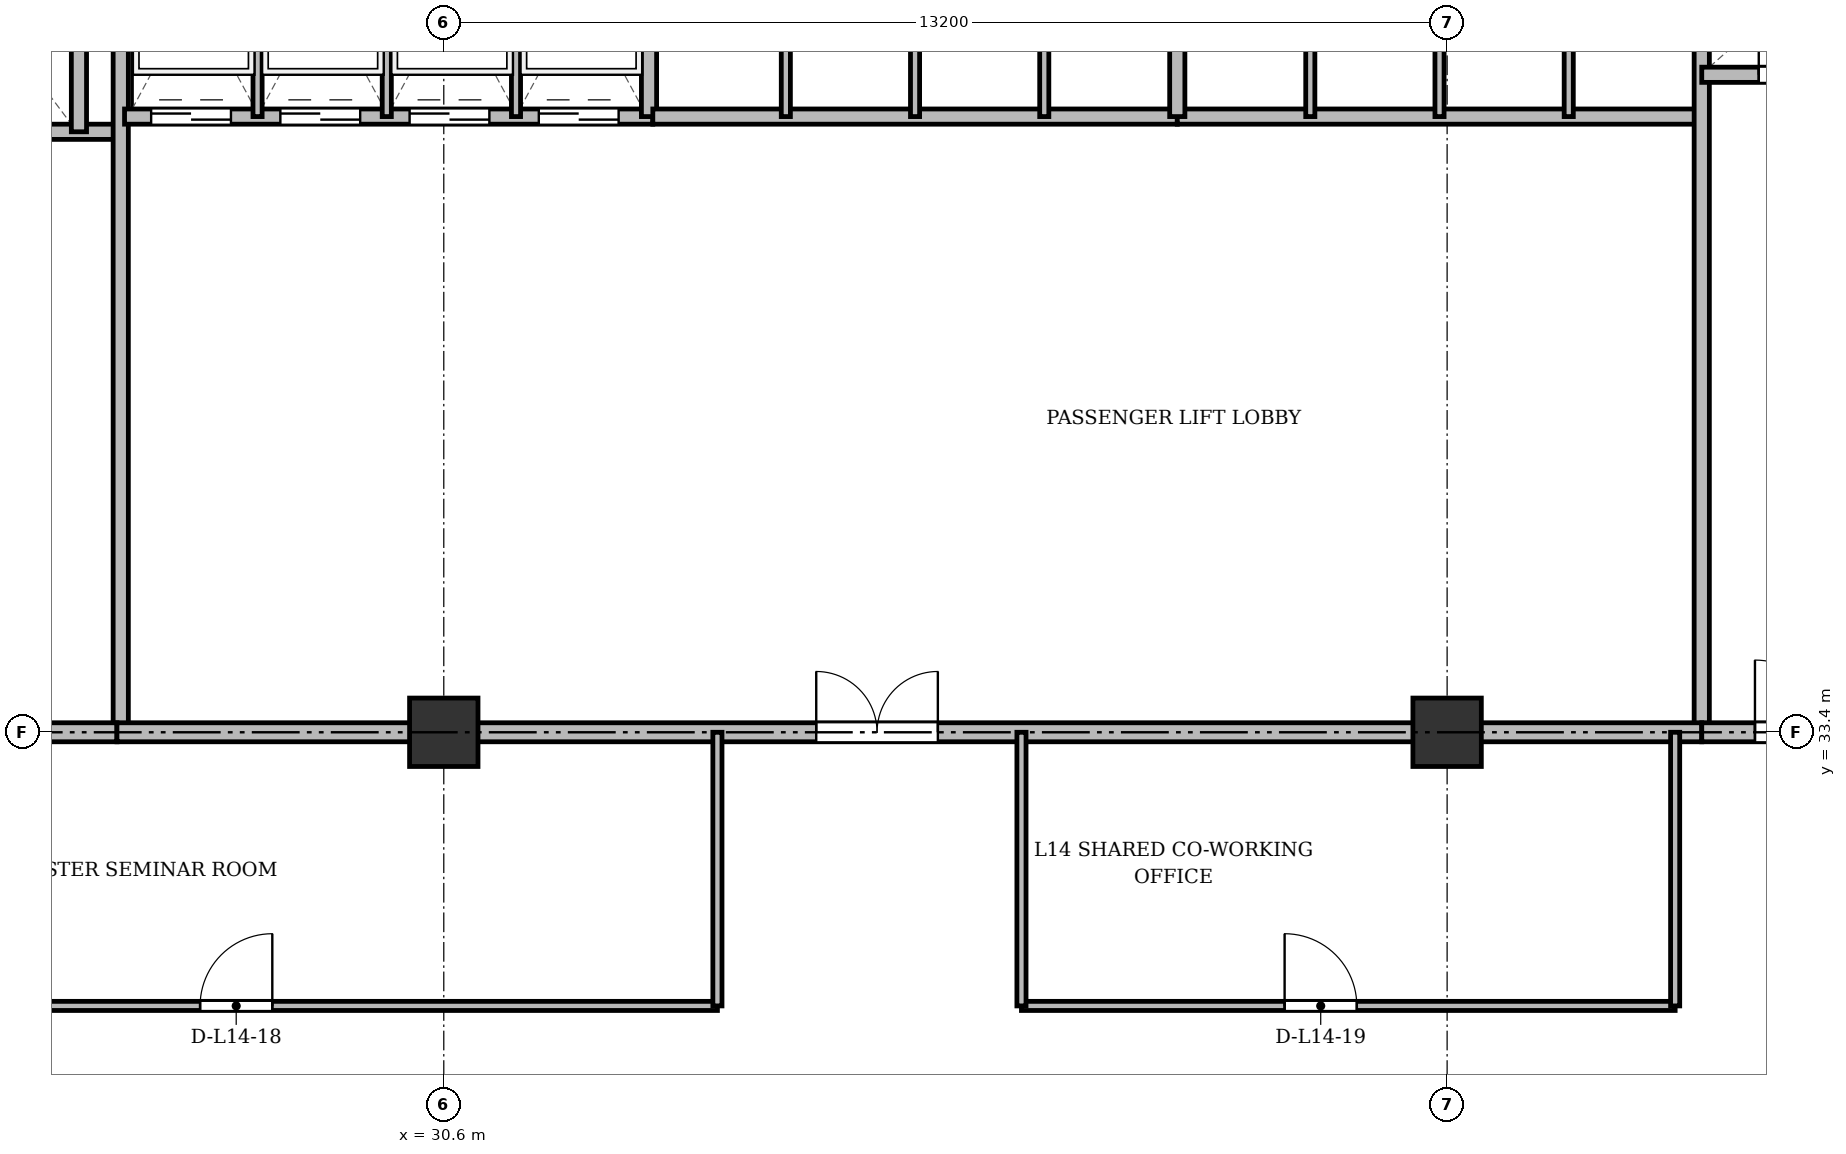
"""IFC4 building model, lengths in metres.
Left out: names, types, materials, properties, quantities, classifications, styles, units other than length and angle.
Written with IfcOpenShell. Run it as: python <this file> out.ifc"""

import sys

from ifc_helpers import new_model, si_unit, direction, frame, frame_2d, origin, origin_2d, place, context, subcontext, project, spatial, rectangle, extrude, source, transform, mapped, element, fill, save


model = new_model("IFC4")
c1 = context("Model", 3, precision=1e-05, world=origin(), true_north=direction((0.0, 1.0)))
c2 = subcontext(c1, "Body", "Model", "MODEL_VIEW")
j1 = project(units=[si_unit("LENGTHUNIT", "METRE"), si_unit("PLANEANGLEUNIT", "RADIAN")], contexts=[c1])
p1 = place(None, origin())
s1 = spatial("IfcSite", under=j1, at=p1, CompositionType="ELEMENT")
p2 = place(p1, origin())
s2 = spatial("IfcBuilding", under=s1, at=p2, CompositionType="ELEMENT")
p3 = place(p2, frame((0.0, 0.0, 55.9)))
s3 = spatial("IfcBuildingStorey", under=s2, at=p3, CompositionType="ELEMENT", Elevation=55.9)
m1 = source(origin(), c2, "Body", "SweptSolid", [
    extrude(rectangle(XDim=0.9, YDim=0.9, at=origin_2d()), origin(), (0.0, 0.0, 1.0), 3.6),
])
for number, where, z_axis, x_axis in (
    (1, (30.6, 33.4, 0.0), (0.0, 0.0, 1.0), (1.0, 0.0, 0.0)),
    (2, (43.8, 33.4, 0.0), (0.0, 0.0, 1.0), (1.0, 0.0, 0.0)),
):
    element("IfcColumn", number, at=place(p3, frame(where, z_axis=z_axis, x_axis=x_axis)), inside=s3, PredefinedType="COLUMN", context=c2, shape_type="MappedRepresentation", body=[
        mapped(m1, transform((0.0, 0.0, 0.0), x_axis=(1.0, 0.0, 0.0), y_axis=(0.0, 1.0, 0.0), z_axis=(0.0, 0.0, 1.0), scale=1.0)),
    ])
p4 = place(p3, frame((19.55, 41.3, 0.0), z_axis=(0.0, 0.0, 1.0), x_axis=(1.0, 0.0, 0.0)))
e3 = element("IfcWall", 3, at=p4, inside=s3, PredefinedType="SOLIDWALL", context=c2, shape_type="SweptSolid", body=[
    extrude(rectangle(XDim=6.75, YDim=0.2, at=frame_2d((3.375, 0.0))), origin(), (0.0, 0.0, 1.0), 3.34),
])
p5 = place(p4, frame((1.7, 0.0, 0.0)))
e4 = element("IfcOpeningElement", 4, at=p5, cuts=e3, PredefinedType="OPENING", context=c2, shape_type="SweptSolid", body=[
    extrude(rectangle(XDim=1.1, YDim=2.15, at=frame_2d((0.55, 1.075))), frame((0.0, 0.11, 0.0), z_axis=(0.0, -1.0, 0.0), x_axis=(1.0, 0.0, 0.0)), (0.0, 0.0, 1.0), 0.22),
])
p6 = place(p4, frame((4.4, 0.0, 0.0)))
e5 = element("IfcOpeningElement", 5, at=p6, cuts=e3, PredefinedType="OPENING", context=c2, shape_type="SweptSolid", body=[
    extrude(rectangle(XDim=1.1, YDim=2.15, at=frame_2d((0.55, 1.075))), frame((0.0, 0.11, 0.0), z_axis=(0.0, -1.0, 0.0), x_axis=(1.0, 0.0, 0.0)), (0.0, 0.0, 1.0), 0.22),
])
p7 = place(p3, frame((25.8, 41.3, 0.0), z_axis=(0.0, 0.0, 1.0), x_axis=(0.0, 1.0, 0.0)))
e6 = element("IfcWall", 6, at=p7, inside=s3, PredefinedType="SOLIDWALL", context=c2, shape_type="SweptSolid", body=[
    extrude(rectangle(XDim=3.4, YDim=0.2, at=frame_2d((1.7, 0.0))), origin(), (0.0, 0.0, 1.0), 3.34),
])
p8 = place(p3, frame((26.35, 33.4, 0.0), z_axis=(0.0, 0.0, 1.0), x_axis=(0.0, 1.0, 0.0)))
e7 = element("IfcWall", 7, at=p8, inside=s3, PredefinedType="SOLIDWALL", context=c2, shape_type="SweptSolid", body=[
    extrude(rectangle(XDim=11.3, YDim=0.2, at=frame_2d((5.65, 0.0))), origin(), (0.0, 0.0, 1.0), 2.69),
])
p9 = place(p3, frame((19.5, 33.4, 0.0), z_axis=(0.0, 0.0, 1.0), x_axis=(1.0, 0.0, 0.0)))
e8 = element("IfcWall", 8, at=p9, inside=s3, PredefinedType="PARTITIONING", context=c2, shape_type="SweptSolid", body=[
    extrude(rectangle(XDim=6.8, YDim=0.25, at=frame_2d((3.4, 0.0))), origin(), (0.0, 0.0, 1.0), 2.69),
])
p10 = place(p9, frame((0.75, 0.0, 0.0)))
e9 = element("IfcOpeningElement", 9, at=p10, cuts=e8, PredefinedType="OPENING", context=c2, shape_type="SweptSolid", body=[
    extrude(rectangle(XDim=1.6, YDim=2.2, at=frame_2d((0.8, 1.1))), frame((0.0, 0.135, 0.0), z_axis=(0.0, -1.0, 0.0), x_axis=(1.0, 0.0, 0.0)), (0.0, 0.0, 1.0), 0.27),
])
p11 = place(p3, frame((26.4, 41.5, 0.0), z_axis=(0.0, 0.0, 1.0), x_axis=(1.0, 0.0, 0.0)))
e10 = element("IfcWall", 10, at=p11, inside=s3, PredefinedType="SOLIDWALL", context=c2, shape_type="SweptSolid", body=[
    extrude(rectangle(XDim=6.95, YDim=0.2, at=frame_2d((3.475, 0.0))), origin(), (0.0, 0.0, 1.0), 3.34),
])
p12 = place(p11, frame((0.35, 0.0, 0.0)))
e11 = element("IfcOpeningElement", 11, at=p12, cuts=e10, PredefinedType="OPENING", context=c2, shape_type="SweptSolid", body=[
    extrude(rectangle(XDim=1.05, YDim=2.15, at=frame_2d((0.525, 1.075))), frame((0.0, 0.11, 0.0), z_axis=(0.0, -1.0, 0.0), x_axis=(1.0, 0.0, 0.0)), (0.0, 0.0, 1.0), 0.22),
])
p13 = place(p11, frame((2.05, 0.0, 0.0)))
e12 = element("IfcOpeningElement", 12, at=p13, cuts=e10, PredefinedType="OPENING", context=c2, shape_type="SweptSolid", body=[
    extrude(rectangle(XDim=1.05, YDim=2.15, at=frame_2d((0.525, 1.075))), frame((0.0, 0.11, 0.0), z_axis=(0.0, -1.0, 0.0), x_axis=(1.0, 0.0, 0.0)), (0.0, 0.0, 1.0), 0.22),
])
p14 = place(p11, frame((3.75, 0.0, 0.0)))
e13 = element("IfcOpeningElement", 13, at=p14, cuts=e10, PredefinedType="OPENING", context=c2, shape_type="SweptSolid", body=[
    extrude(rectangle(XDim=1.05, YDim=2.15, at=frame_2d((0.525, 1.075))), frame((0.0, 0.11, 0.0), z_axis=(0.0, -1.0, 0.0), x_axis=(1.0, 0.0, 0.0)), (0.0, 0.0, 1.0), 0.22),
])
p15 = place(p11, frame((5.45, 0.0, 0.0)))
e14 = element("IfcOpeningElement", 14, at=p15, cuts=e10, PredefinedType="OPENING", context=c2, shape_type="SweptSolid", body=[
    extrude(rectangle(XDim=1.05, YDim=2.15, at=frame_2d((0.525, 1.075))), frame((0.0, 0.11, 0.0), z_axis=(0.0, -1.0, 0.0), x_axis=(1.0, 0.0, 0.0)), (0.0, 0.0, 1.0), 0.22),
])
p16 = place(p3, frame((33.3, 41.5, 0.0), z_axis=(0.0, 0.0, 1.0), x_axis=(0.0, 1.0, 0.0)))
e15 = element("IfcWall", 15, at=p16, inside=s3, PredefinedType="SOLIDWALL", context=c2, shape_type="SweptSolid", body=[
    extrude(rectangle(XDim=3.2, YDim=0.2, at=frame_2d((1.6, 0.0))), origin(), (0.0, 0.0, 1.0), 3.34),
])
for number, where, z_axis, x_axis in (
    (16, (28.15, 41.5, 0.0), (0.0, 0.0, 1.0), (0.0, 1.0, 0.0)),
    (17, (29.85, 41.5, 0.0), (0.0, 0.0, 1.0), (0.0, 1.0, 0.0)),
    (18, (31.55, 41.5, 0.0), (0.0, 0.0, 1.0), (0.0, 1.0, 0.0)),
):
    element("IfcWall", number, at=place(p3, frame(where, z_axis=z_axis, x_axis=x_axis)), inside=s3, PredefinedType="PARTITIONING", context=c2, shape_type="SweptSolid", body=[
        extrude(rectangle(XDim=3.2, YDim=0.12, at=frame_2d((1.6, 0.0))), origin(), (0.0, 0.0, 1.0), 3.34),
    ])
p17 = place(p3, frame((33.35, 41.5, 0.0), z_axis=(0.0, 0.0, 1.0), x_axis=(1.0, 0.0, 0.0)))
e19 = element("IfcWall", 19, at=p17, inside=s3, PredefinedType="SOLIDWALL", context=c2, shape_type="SweptSolid", body=[
    extrude(rectangle(XDim=6.9, YDim=0.2, at=frame_2d((3.45, 0.0))), origin(), (0.0, 0.0, 1.0), 3.34),
])
for number, where, z_axis, x_axis in (
    (20, (35.1, 41.5, 0.0), (0.0, 0.0, 1.0), (0.0, 1.0, 0.0)),
    (21, (36.8, 41.5, 0.0), (0.0, 0.0, 1.0), (0.0, 1.0, 0.0)),
    (22, (38.5, 41.5, 0.0), (0.0, 0.0, 1.0), (0.0, 1.0, 0.0)),
):
    element("IfcWall", number, at=place(p3, frame(where, z_axis=z_axis, x_axis=x_axis)), inside=s3, PredefinedType="PARTITIONING", context=c2, shape_type="SweptSolid", body=[
        extrude(rectangle(XDim=3.2, YDim=0.12, at=frame_2d((1.6, 0.0))), origin(), (0.0, 0.0, 1.0), 3.34),
    ])
p18 = place(p3, frame((40.25, 41.5, 0.0), z_axis=(0.0, 0.0, 1.0), x_axis=(1.0, 0.0, 0.0)))
e23 = element("IfcWall", 23, at=p18, inside=s3, PredefinedType="SOLIDWALL", context=c2, shape_type="SweptSolid", body=[
    extrude(rectangle(XDim=6.9, YDim=0.2, at=frame_2d((3.45, 0.0))), origin(), (0.0, 0.0, 1.0), 2.752),
])
p19 = place(p3, frame((40.25, 41.5, 0.0), z_axis=(0.0, 0.0, 1.0), x_axis=(0.0, 1.0, 0.0)))
e24 = element("IfcWall", 24, at=p19, inside=s3, PredefinedType="SOLIDWALL", context=c2, shape_type="SweptSolid", body=[
    extrude(rectangle(XDim=3.2, YDim=0.2, at=frame_2d((1.6, 0.0))), origin(), (0.0, 0.0, 1.0), 3.34),
])
p20 = place(p3, frame((42.0, 41.5, 0.0), z_axis=(0.0, 0.0, 1.0), x_axis=(0.0, 1.0, 0.0)))
e25 = element("IfcWall", 25, at=p20, inside=s3, PredefinedType="PARTITIONING", context=c2, shape_type="SweptSolid", body=[
    extrude(rectangle(XDim=3.2, YDim=0.12, at=frame_2d((1.6, 0.0))), origin(), (0.0, 0.0, 1.0), 3.34),
])
p21 = place(p3, frame((43.7, 41.5, 0.0), z_axis=(0.0, 0.0, 1.0), x_axis=(0.0, 1.0, 0.0)))
e26 = element("IfcWall", 26, at=p21, inside=s3, PredefinedType="PARTITIONING", context=c2, shape_type="SweptSolid", body=[
    extrude(rectangle(XDim=3.2, YDim=0.12, at=frame_2d((1.6, 0.0))), origin(), (0.0, 0.0, 1.0), 2.752),
])
p22 = place(p3, frame((45.4, 41.5, 0.0), z_axis=(0.0, 0.0, 1.0), x_axis=(0.0, 1.0, 0.0)))
e27 = element("IfcWall", 27, at=p22, inside=s3, PredefinedType="PARTITIONING", context=c2, shape_type="SweptSolid", body=[
    extrude(rectangle(XDim=3.2, YDim=0.12, at=frame_2d((1.6, 0.0))), origin(), (0.0, 0.0, 1.0), 3.34),
])
p23 = place(p3, frame((47.15, 33.4, 0.0), z_axis=(0.0, 0.0, 1.0), x_axis=(0.0, 1.0, 0.0)))
e28 = element("IfcWall", 28, at=p23, inside=s3, PredefinedType="SOLIDWALL", context=c2, shape_type="SweptSolid", body=[
    extrude(rectangle(XDim=11.3, YDim=0.2, at=frame_2d((5.65, 0.0))), origin(), (0.0, 0.0, 1.0), 2.69),
])
p24 = place(p3, frame((26.3, 33.4, 0.0), z_axis=(0.0, 0.0, 1.0), x_axis=(1.0, 0.0, 0.0)))
e29 = element("IfcWall", 29, at=p24, inside=s3, PredefinedType="PARTITIONING", context=c2, shape_type="SweptSolid", body=[
    extrude(rectangle(XDim=20.85, YDim=0.25, at=frame_2d((10.425, 0.0))), origin(), (0.0, 0.0, 1.0), 2.69),
])
p25 = place(p24, frame((9.2, 0.0, 0.0)))
e30 = element("IfcOpeningElement", 30, at=p25, cuts=e29, PredefinedType="OPENING", context=c2, shape_type="SweptSolid", body=[
    extrude(rectangle(XDim=1.6, YDim=2.2, at=frame_2d((0.8, 1.1))), frame((0.0, 0.135, 0.0), z_axis=(0.0, -1.0, 0.0), x_axis=(1.0, 0.0, 0.0)), (0.0, 0.0, 1.0), 0.27),
])
p26 = place(p3, frame((47.15, 42.05, 0.0), z_axis=(0.0, 0.0, 1.0), x_axis=(1.0, 0.0, 0.0)))
e31 = element("IfcWall", 31, at=p26, inside=s3, PredefinedType="SOLIDWALL", context=c2, shape_type="SweptSolid", body=[
    extrude(rectangle(XDim=7.85, YDim=0.2, at=frame_2d((3.925, 0.0))), origin(), (0.0, 0.0, 1.0), 2.752),
])
p27 = place(p26, frame((0.75, 0.0, 0.0)))
e32 = element("IfcOpeningElement", 32, at=p27, cuts=e31, PredefinedType="OPENING", context=c2, shape_type="SweptSolid", body=[
    extrude(rectangle(XDim=0.9, YDim=2.1, at=frame_2d((0.45, 1.05))), frame((0.0, 0.11, 0.0), z_axis=(0.0, -1.0, 0.0), x_axis=(1.0, 0.0, 0.0)), (0.0, 0.0, 1.0), 0.22),
])
p28 = place(p26, frame((3.85, 0.0, 0.0)))
e33 = element("IfcOpeningElement", 33, at=p28, cuts=e31, PredefinedType="OPENING", context=c2, shape_type="SweptSolid", body=[
    extrude(rectangle(XDim=0.9, YDim=2.1, at=frame_2d((0.45, 1.05))), frame((0.0, 0.11, 0.0), z_axis=(0.0, -1.0, 0.0), x_axis=(1.0, 0.0, 0.0)), (0.0, 0.0, 1.0), 0.22),
])
p29 = place(p3, frame((47.15, 33.4, 0.0), z_axis=(0.0, 0.0, 1.0), x_axis=(1.0, 0.0, 0.0)))
e34 = element("IfcWall", 34, at=p29, inside=s3, PredefinedType="PARTITIONING", context=c2, shape_type="SweptSolid", body=[
    extrude(rectangle(XDim=11.15, YDim=0.25, at=frame_2d((5.575, 0.0))), origin(), (0.0, 0.0, 1.0), 2.69),
])
p30 = place(p29, frame((0.7, 0.0, 0.0)))
e35 = element("IfcOpeningElement", 35, at=p30, cuts=e34, PredefinedType="OPENING", context=c2, shape_type="SweptSolid", body=[
    extrude(rectangle(XDim=0.95, YDim=2.15, at=frame_2d((0.475, 1.075))), frame((0.0, 0.135, 0.0), z_axis=(0.0, -1.0, 0.0), x_axis=(1.0, 0.0, 0.0)), (0.0, 0.0, 1.0), 0.27),
])
p31 = place(p29, frame((6.0, 0.0, 0.0)))
e36 = element("IfcOpeningElement", 36, at=p31, cuts=e34, PredefinedType="OPENING", context=c2, shape_type="SweptSolid", body=[
    extrude(rectangle(XDim=1.2, YDim=2.15, at=frame_2d((0.6, 1.075))), frame((0.0, 0.135, 0.0), z_axis=(0.0, -1.0, 0.0), x_axis=(1.0, 0.0, 0.0)), (0.0, 0.0, 1.0), 0.27),
])
p32 = place(p3, frame((22.45, 29.8, 0.0), z_axis=(0.0, 0.0, 1.0), x_axis=(1.0, 0.0, 0.0)))
e37 = element("IfcWall", 37, at=p32, inside=s3, PredefinedType="PARTITIONING", context=c2, shape_type="SweptSolid", body=[
    extrude(rectangle(XDim=11.75, YDim=0.12, at=frame_2d((5.875, 0.0))), origin(), (0.0, 0.0, 1.0), 2.752),
])
p33 = place(p32, frame((4.944, 0.0, 0.0)))
e38 = element("IfcOpeningElement", 38, at=p33, cuts=e37, PredefinedType="OPENING", context=c2, shape_type="SweptSolid", body=[
    extrude(rectangle(XDim=0.95, YDim=2.15, at=frame_2d((0.475, 1.075))), frame((0.0, 0.07, 0.0), z_axis=(0.0, -1.0, 0.0), x_axis=(1.0, 0.0, 0.0)), (0.0, 0.0, 1.0), 0.14),
])
p34 = place(p3, frame((38.2, 29.8, 0.0), z_axis=(0.0, 0.0, 1.0), x_axis=(1.0, 0.0, 0.0)))
e39 = element("IfcWall", 39, at=p34, inside=s3, PredefinedType="PARTITIONING", context=c2, shape_type="SweptSolid", body=[
    extrude(rectangle(XDim=8.6, YDim=0.12, at=frame_2d((4.3, 0.0))), origin(), (0.0, 0.0, 1.0), 2.752),
])
p35 = place(p34, frame((3.462, 0.0, 0.0)))
e40 = element("IfcOpeningElement", 40, at=p35, cuts=e39, PredefinedType="OPENING", context=c2, shape_type="SweptSolid", body=[
    extrude(rectangle(XDim=0.95, YDim=2.15, at=frame_2d((0.475, 1.075))), frame((0.0, 0.07, 0.0), z_axis=(0.0, -1.0, 0.0), x_axis=(1.0, 0.0, 0.0)), (0.0, 0.0, 1.0), 0.14),
])
for number, where, z_axis, x_axis in (
    (41, (34.2, 29.8, 0.0), (0.0, 0.0, 1.0), (0.0, 1.0, 0.0)),
    (42, (38.2, 29.8, 0.0), (0.0, 0.0, 1.0), (0.0, 1.0, 0.0)),
    (43, (46.8, 29.8, 0.0), (0.0, 0.0, 1.0), (0.0, 1.0, 0.0)),
):
    element("IfcWall", number, at=place(p3, frame(where, z_axis=z_axis, x_axis=x_axis)), inside=s3, PredefinedType="PARTITIONING", context=c2, shape_type="SweptSolid", body=[
        extrude(rectangle(XDim=3.6, YDim=0.12, at=frame_2d((1.8, 0.0))), origin(), (0.0, 0.0, 1.0), 2.69),
    ])
m2 = source(origin(), c2, "Body", "SweptSolid", [
    extrude(rectangle(XDim=1.05, YDim=2.15, at=frame_2d((0.525, 1.075))), frame((0.0, 0.025, 0.0), z_axis=(0.0, -1.0, 0.0), x_axis=(1.0, 0.0, 0.0)), (0.0, 0.0, 1.0), 0.05),
])
p36 = place(p12, origin())
e44 = element("IfcDoor", 44, at=p36, inside=s3, OperationType="DOUBLE_DOOR_SLIDING", PredefinedType="DOOR", context=c2, shape_type="MappedRepresentation", body=[
    mapped(m2, transform((0.0, 0.0, 0.0), x_axis=(1.0, 0.0, 0.0), y_axis=(0.0, 1.0, 0.0), z_axis=(0.0, 0.0, 1.0), scale=1.0)),
])
fill(e11, e44)
p37 = place(p13, origin())
e45 = element("IfcDoor", 45, at=p37, inside=s3, OperationType="DOUBLE_DOOR_SLIDING", PredefinedType="DOOR", context=c2, shape_type="MappedRepresentation", body=[
    mapped(m2, transform((0.0, 0.0, 0.0), x_axis=(1.0, 0.0, 0.0), y_axis=(0.0, 1.0, 0.0), z_axis=(0.0, 0.0, 1.0), scale=1.0)),
])
fill(e12, e45)
p38 = place(p14, origin())
e46 = element("IfcDoor", 46, at=p38, inside=s3, OperationType="DOUBLE_DOOR_SLIDING", PredefinedType="DOOR", context=c2, shape_type="MappedRepresentation", body=[
    mapped(m2, transform((0.0, 0.0, 0.0), x_axis=(1.0, 0.0, 0.0), y_axis=(0.0, 1.0, 0.0), z_axis=(0.0, 0.0, 1.0), scale=1.0)),
])
fill(e13, e46)
p39 = place(p15, origin())
e47 = element("IfcDoor", 47, at=p39, inside=s3, OperationType="DOUBLE_DOOR_SLIDING", PredefinedType="DOOR", context=c2, shape_type="MappedRepresentation", body=[
    mapped(m2, transform((0.0, 0.0, 0.0), x_axis=(1.0, 0.0, 0.0), y_axis=(0.0, 1.0, 0.0), z_axis=(0.0, 0.0, 1.0), scale=1.0)),
])
fill(e14, e47)
m3 = source(origin(), c2, "Body", "SweptSolid", [
    extrude(rectangle(XDim=1.6, YDim=2.2, at=frame_2d((0.8, 1.1))), frame((0.0, 0.025, 0.0), z_axis=(0.0, -1.0, 0.0), x_axis=(1.0, 0.0, 0.0)), (0.0, 0.0, 1.0), 0.05),
])
p40 = place(p25, origin())
e48 = element("IfcDoor", 48, at=p40, inside=s3, OperationType="DOUBLE_DOOR_SINGLE_SWING", PredefinedType="DOOR", context=c2, shape_type="MappedRepresentation", body=[
    mapped(m3, transform((0.0, 0.0, 0.0), x_axis=(1.0, 0.0, 0.0), y_axis=(0.0, 1.0, 0.0), z_axis=(0.0, 0.0, 1.0), scale=1.0)),
])
fill(e30, e48)
m4 = source(origin(), c2, "Body", "SweptSolid", [
    extrude(rectangle(XDim=0.9, YDim=2.1, at=frame_2d((0.45, 1.05))), frame((0.0, 0.025, 0.0), z_axis=(0.0, -1.0, 0.0), x_axis=(1.0, 0.0, 0.0)), (0.0, 0.0, 1.0), 0.05),
])
p41 = place(p27, origin())
e49 = element("IfcDoor", 49, at=p41, inside=s3, OperationType="SINGLE_SWING_LEFT", PredefinedType="DOOR", context=c2, shape_type="MappedRepresentation", body=[
    mapped(m4, transform((0.0, 0.0, 0.0), x_axis=(1.0, 0.0, 0.0), y_axis=(0.0, 1.0, 0.0), z_axis=(0.0, 0.0, 1.0), scale=1.0)),
])
fill(e32, e49)
m5 = source(origin(), c2, "Body", "SweptSolid", [
    extrude(rectangle(XDim=0.95, YDim=2.15, at=frame_2d((0.475, 1.075))), frame((0.0, 0.025, 0.0), z_axis=(0.0, -1.0, 0.0), x_axis=(1.0, 0.0, 0.0)), (0.0, 0.0, 1.0), 0.05),
])
p42 = place(p30, origin())
e50 = element("IfcDoor", 50, at=p42, inside=s3, OperationType="SINGLE_SWING_LEFT", PredefinedType="DOOR", context=c2, shape_type="MappedRepresentation", body=[
    mapped(m5, transform((0.0, 0.0, 0.0), x_axis=(1.0, 0.0, 0.0), y_axis=(0.0, 1.0, 0.0), z_axis=(0.0, 0.0, 1.0), scale=1.0)),
])
fill(e35, e50)
p43 = place(p33, origin())
e51 = element("IfcDoor", 51, at=p43, inside=s3, OperationType="SINGLE_SWING_RIGHT", PredefinedType="DOOR", context=c2, shape_type="MappedRepresentation", body=[
    mapped(m5, transform((0.0, 0.0, 0.0), x_axis=(1.0, 0.0, 0.0), y_axis=(0.0, 1.0, 0.0), z_axis=(0.0, 0.0, 1.0), scale=1.0)),
])
fill(e38, e51)
p44 = place(p35, origin())
e52 = element("IfcDoor", 52, at=p44, inside=s3, OperationType="SINGLE_SWING_LEFT", PredefinedType="DOOR", context=c2, shape_type="MappedRepresentation", body=[
    mapped(m5, transform((0.0, 0.0, 0.0), x_axis=(1.0, 0.0, 0.0), y_axis=(0.0, 1.0, 0.0), z_axis=(0.0, 0.0, 1.0), scale=1.0)),
])
fill(e40, e52)
save(model, sys.argv[1])
